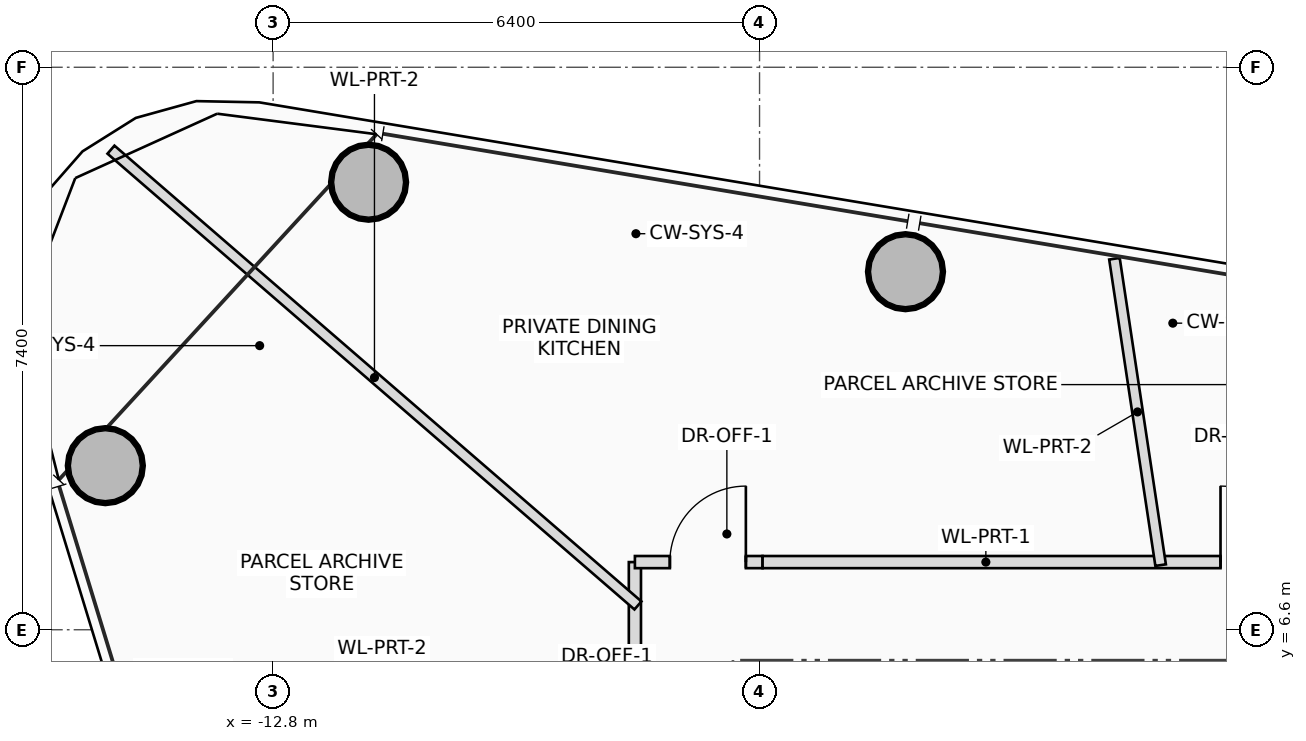
"""IFC4 building model, lengths in metres.
Left out: names, types, materials, properties, quantities, classifications, styles, units other than length and angle.
Written with IfcOpenShell. Run it as: python <this file> out.ifc"""

import sys

from ifc_helpers import new_model, si_unit, direction, frame, frame_2d, origin, origin_2d, place, context, subcontext, project, spatial, rectangle, hollow_circle, extrude, source, transform, mapped, element, fill, save


model = new_model("IFC4")
c1 = context("Model", 3, precision=1e-05, world=origin(), true_north=direction((0.0, 1.0)))
c2 = subcontext(c1, "Body", "Model", "MODEL_VIEW")
j1 = project(units=[si_unit("LENGTHUNIT", "METRE"), si_unit("PLANEANGLEUNIT", "RADIAN")], contexts=[c1])
p1 = place(None, origin())
s1 = spatial("IfcSite", under=j1, at=p1, CompositionType="ELEMENT")
p2 = place(p1, origin())
s2 = spatial("IfcBuilding", under=s1, at=p2, CompositionType="ELEMENT")
p3 = place(p2, frame((0.0, 0.0, 242.25)))
s3 = spatial("IfcBuildingStorey", under=s2, at=p3, CompositionType="ELEMENT", Elevation=242.25)
m1 = source(origin(), c2, "Body", "SweptSolid", [
    extrude(hollow_circle(Radius=0.5, WallThickness=0.04, at=origin_2d()), origin(), (0.0, 0.0, 1.0), 3.4),
])
for number, where, z_axis, x_axis in (
    (1, (-4.48, 11.311, 0.0), (0.0, 0.0, 1.0), (1.0, 0.0, 0.0)),
    (2, (-11.544, 12.488, 0.0), (0.0, 0.0, 1.0), (1.0, 0.0, 0.0)),
    (3, (-15.008, 8.759, 0.0), (0.0, 0.0, 1.0), (1.0, 0.0, 0.0)),
):
    element("IfcColumn", number, at=place(p3, frame(where, z_axis=z_axis, x_axis=x_axis)), inside=s3, PredefinedType="COLUMN", context=c2, shape_type="MappedRepresentation", body=[
        mapped(m1, transform((0.0, 0.0, 0.0), scale=1.0)),
    ])
p4 = place(p3, frame((-8.04, 5.85, 0.0), z_axis=(0.0, 0.0, 1.0), x_axis=(0.0, 1.0, 0.0)))
e4 = element("IfcWall", 4, at=p4, inside=s3, PredefinedType="PARTITIONING", context=c2, shape_type="SweptSolid", body=[
    extrude(rectangle(XDim=1.64, YDim=0.16, at=frame_2d((0.82, 0.0))), origin(), (0.0, 0.0, 1.0), 2.605),
])
p5 = place(p3, frame((-8.04, 7.49, 0.0), z_axis=(0.0, 0.0, 1.0), x_axis=(1.0, 0.0, 0.0)))
e5 = element("IfcWall", 5, at=p5, inside=s3, PredefinedType="PARTITIONING", context=c2, shape_type="SweptSolid", body=[
    extrude(rectangle(XDim=1.68, YDim=0.16, at=frame_2d((0.84, 0.0))), origin(), (0.0, 0.0, 1.0), 2.605),
])
p6 = place(p5, frame((0.46, 0.0, 0.0)))
e6 = element("IfcOpeningElement", 6, at=p6, cuts=e5, PredefinedType="OPENING", context=c2, shape_type="SweptSolid", body=[
    extrude(rectangle(XDim=1.0, YDim=2.25, at=frame_2d((0.5, 1.125))), frame((0.0, 0.09, 0.0), z_axis=(0.0, -1.0, 0.0), x_axis=(1.0, 0.0, 0.0)), (0.0, 0.0, 1.0), 0.18),
])
p7 = place(p3, frame((-6.36, 7.49, 0.0), z_axis=(0.0, 0.0, 1.0), x_axis=(1.0, 0.0, 0.0)))
e7 = element("IfcWall", 7, at=p7, inside=s3, PredefinedType="PARTITIONING", context=c2, shape_type="SweptSolid", body=[
    extrude(rectangle(XDim=9.81, YDim=0.16, at=frame_2d((4.905, 0.0))), origin(), (0.0, 0.0, 1.0), 2.605),
])
p8 = place(p7, frame((6.025, 0.0, 0.0)))
e8 = element("IfcOpeningElement", 8, at=p8, cuts=e7, PredefinedType="OPENING", context=c2, shape_type="SweptSolid", body=[
    extrude(rectangle(XDim=1.0, YDim=2.25, at=frame_2d((0.5, 1.125))), frame((0.0, 0.09, 0.0), z_axis=(0.0, -1.0, 0.0), x_axis=(1.0, 0.0, 0.0)), (0.0, 0.0, 1.0), 0.18),
])
p9 = place(p7, frame((8.487, 0.0, 0.0)))
e9 = element("IfcOpeningElement", 9, at=p9, cuts=e7, PredefinedType="OPENING", context=c2, shape_type="SweptSolid", body=[
    extrude(rectangle(XDim=1.0, YDim=2.25, at=frame_2d((0.5, 1.125))), frame((0.0, 0.09, 0.0), z_axis=(0.0, -1.0, 0.0), x_axis=(1.0, 0.0, 0.0)), (0.0, 0.0, 1.0), 0.18),
])
p10 = place(p3, frame((-1.123, 7.45, 0.0), z_axis=(0.0, 0.0, 1.0), x_axis=(-0.149063767164, 0.988827585234, 0.0)))
e10 = element("IfcWall", 10, at=p10, inside=s3, PredefinedType="PARTITIONING", context=c2, shape_type="SweptSolid", body=[
    extrude(rectangle(XDim=4.077, YDim=0.14, at=frame_2d((2.038, 0.0))), origin(), (0.0, 0.0, 1.0), 2.765),
])
p11 = place(p3, frame((-8.0, 6.919, 0.0), z_axis=(0.0, 0.0, 1.0), x_axis=(-0.756353912554, 0.654162639535, 0.0)))
e11 = element("IfcWall", 11, at=p11, inside=s3, PredefinedType="PARTITIONING", context=c2, shape_type="SweptSolid", body=[
    extrude(rectangle(XDim=9.167, YDim=0.14, at=frame_2d((4.583, 0.0))), origin(), (0.0, 0.0, 1.0), 2.765),
])
p12 = place(p6, origin())
e12 = element("IfcDoor", 12, at=p12, inside=s3, OperationType="SINGLE_SWING_RIGHT", PredefinedType="DOOR", context=c2, shape_type="SweptSolid", body=[
    extrude(rectangle(XDim=1.0, YDim=2.25, at=frame_2d((0.5, 1.125))), frame((0.0, 0.025, 0.0), z_axis=(0.0, -1.0, 0.0), x_axis=(1.0, 0.0, 0.0)), (0.0, 0.0, 1.0), 0.05),
])
fill(e6, e12)
p13 = place(p8, origin())
e13 = element("IfcDoor", 13, at=p13, inside=s3, OperationType="SINGLE_SWING_LEFT", PredefinedType="DOOR", context=c2, shape_type="SweptSolid", body=[
    extrude(rectangle(XDim=1.0, YDim=2.25, at=frame_2d((0.5, 1.125))), frame((0.0, 0.025, 0.0), z_axis=(0.0, -1.0, 0.0), x_axis=(1.0, 0.0, 0.0)), (0.0, 0.0, 1.0), 0.05),
])
fill(e8, e13)
save(model, sys.argv[1])
